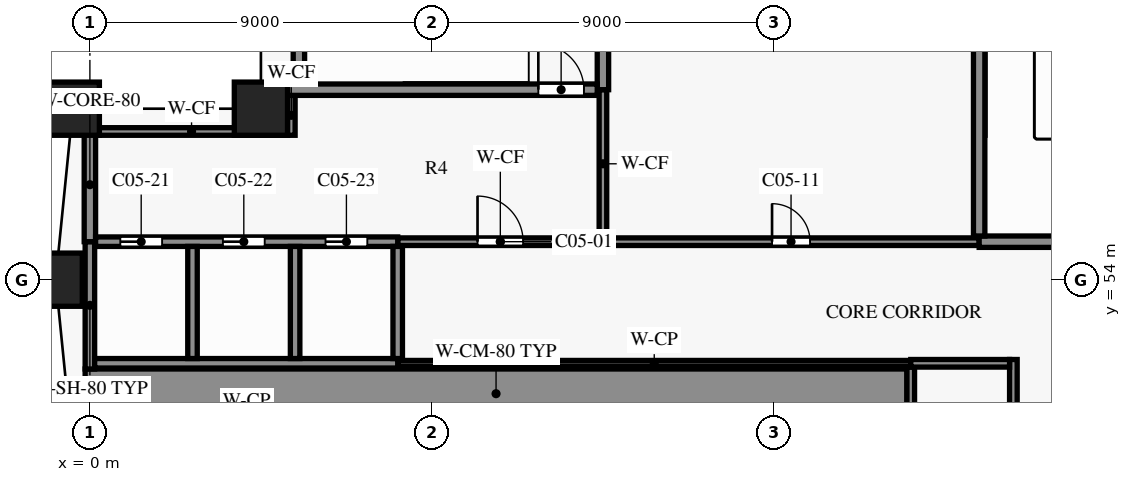
"""IFC4 building model, lengths in metres.
Left out: names, types, materials, properties, quantities, classifications, styles, units other than length and angle.
Written with IfcOpenShell. Run it as: python <this file> out.ifc"""

import sys

from ifc_helpers import new_model, si_unit, direction, frame, frame_2d, origin, origin_2d, place, context, subcontext, project, spatial, rectangle, extrude, element, fill, save


model = new_model("IFC4")
c1 = context("Model", 3, precision=1e-05, world=origin(), true_north=direction((0.0, 1.0)))
c2 = subcontext(c1, "Body", "Model", "MODEL_VIEW")
j1 = project(units=[si_unit("LENGTHUNIT", "METRE"), si_unit("PLANEANGLEUNIT", "RADIAN")], contexts=[c1])
p1 = place(None, origin())
s1 = spatial("IfcSite", under=j1, at=p1, CompositionType="ELEMENT")
p2 = place(p1, origin())
s2 = spatial("IfcBuilding", under=s1, at=p2, CompositionType="ELEMENT")
p3 = place(p2, frame((0.0, 0.0, 19.5)))
s3 = spatial("IfcBuildingStorey", under=s2, at=p3, CompositionType="ELEMENT", Elevation=19.5)
for number, where, z_axis, x_axis in (
    (1, (-0.45, 58.5, 0.0), (0.0, 0.0, 1.0), (1.0, 0.0, 0.0)),
    (2, (-0.9, 54.0, 0.0), (0.0, 0.0, 1.0), (1.0, 0.0, 0.0)),
    (3, (4.5, 58.5, 0.0), (0.0, 0.0, 1.0), (1.0, 0.0, 0.0)),
):
    element("IfcColumn", number, at=place(p3, frame(where, z_axis=z_axis, x_axis=x_axis)), inside=s3, PredefinedType="COLUMN", context=c2, shape_type="SweptSolid", body=[
        extrude(rectangle(XDim=1.4, YDim=1.4, at=origin_2d()), origin(), (0.0, 0.0, 1.0), 8.0),
    ])
p4 = place(p3, frame((-0.125, 51.0, 0.0), z_axis=(0.0, 0.0, 1.0), x_axis=(1.0, 0.0, 0.0)))
e4 = element("IfcWall", 4, at=p4, inside=s3, PredefinedType="SHEAR", context=c2, shape_type="SweptSolid", body=[
    extrude(rectangle(XDim=21.625, YDim=1.3, at=frame_2d((10.812, 0.0))), origin(), (0.0, 0.0, 1.0), 7.7),
])
p5 = place(p3, frame((8.1, 51.8, 0.0), z_axis=(0.0, 0.0, 1.0), x_axis=(1.0, 0.0, 0.0)))
e5 = element("IfcWall", 5, at=p5, inside=s3, PredefinedType="PARTITIONING", context=c2, shape_type="SweptSolid", body=[
    extrude(rectangle(XDim=13.5, YDim=0.15, at=frame_2d((6.75, 0.0))), origin(), (0.0, 0.0, 1.0), 7.7),
])
p6 = place(p3, frame((21.6, 51.8, 0.0), z_axis=(0.0, 0.0, 1.0), x_axis=(1.0, 0.0, 0.0)))
e6 = element("IfcWall", 6, at=p6, inside=s3, PredefinedType="PARTITIONING", context=c2, shape_type="SweptSolid", body=[
    extrude(rectangle(XDim=2.6, YDim=0.2, at=frame_2d((1.3, 0.0))), origin(), (0.0, 0.0, 1.0), 7.7),
])
p7 = place(p3, frame((0.125, 51.8, 0.0), z_axis=(0.0, 0.0, 1.0), x_axis=(1.0, 0.0, 0.0)))
e7 = element("IfcWall", 7, at=p7, inside=s3, PredefinedType="SHEAR", context=c2, shape_type="SweptSolid", body=[
    extrude(rectangle(XDim=7.975, YDim=0.25, at=frame_2d((3.988, 0.0))), origin(), (0.0, 0.0, 1.0), 7.7),
])
p8 = place(p3, frame((8.1, 55.0, 0.0), z_axis=(0.0, 0.0, 1.0), x_axis=(1.0, 0.0, 0.0)))
e8 = element("IfcWall", 8, at=p8, inside=s3, PredefinedType="PARTITIONING", context=c2, shape_type="SweptSolid", body=[
    extrude(rectangle(XDim=5.4, YDim=0.2, at=frame_2d((2.7, 0.0))), origin(), (0.0, 0.0, 1.0), 7.7),
])
p9 = place(p8, frame((2.1, 0.0, 0.0)))
e9 = element("IfcOpeningElement", 9, at=p9, cuts=e8, PredefinedType="OPENING", context=c2, shape_type="SweptSolid", body=[
    extrude(rectangle(XDim=1.2, YDim=2.2, at=frame_2d((0.6, 1.1))), frame((0.0, 0.11, 0.0), z_axis=(0.0, -1.0, 0.0), x_axis=(1.0, 0.0, 0.0)), (0.0, 0.0, 1.0), 0.22),
])
p10 = place(p3, frame((13.5, 55.0, 0.0), z_axis=(0.0, 0.0, 1.0), x_axis=(1.0, 0.0, 0.0)))
e10 = element("IfcWall", 10, at=p10, inside=s3, PredefinedType="PARTITIONING", context=c2, shape_type="SweptSolid", body=[
    extrude(rectangle(XDim=9.9, YDim=0.2, at=frame_2d((4.95, 0.0))), origin(), (0.0, 0.0, 1.0), 7.7),
])
p11 = place(p10, frame((4.45, 0.0, 0.0)))
e11 = element("IfcOpeningElement", 11, at=p11, cuts=e10, PredefinedType="OPENING", context=c2, shape_type="SweptSolid", body=[
    extrude(rectangle(XDim=1.0, YDim=2.1, at=frame_2d((0.5, 1.05))), frame((0.0, 0.11, 0.0), z_axis=(0.0, -1.0, 0.0), x_axis=(1.0, 0.0, 0.0)), (0.0, 0.0, 1.0), 0.22),
])
p12 = place(p3, frame((0.15, 55.0, 0.0), z_axis=(0.0, 0.0, 1.0), x_axis=(1.0, 0.0, 0.0)))
e12 = element("IfcWall", 12, at=p12, inside=s3, PredefinedType="SHEAR", context=c2, shape_type="SweptSolid", body=[
    extrude(rectangle(XDim=7.95, YDim=0.25, at=frame_2d((3.975, 0.0))), origin(), (0.0, 0.0, 1.0), 7.7),
])
p13 = place(p12, frame((0.65, 0.0, 0.0)))
e13 = element("IfcOpeningElement", 13, at=p13, cuts=e12, PredefinedType="OPENING", context=c2, shape_type="SweptSolid", body=[
    extrude(rectangle(XDim=1.1, YDim=2.1, at=frame_2d((0.55, 1.05))), frame((0.0, 0.135, 0.0), z_axis=(0.0, -1.0, 0.0), x_axis=(1.0, 0.0, 0.0)), (0.0, 0.0, 1.0), 0.27),
])
p14 = place(p12, frame((3.35, 0.0, 0.0)))
e14 = element("IfcOpeningElement", 14, at=p14, cuts=e12, PredefinedType="OPENING", context=c2, shape_type="SweptSolid", body=[
    extrude(rectangle(XDim=1.1, YDim=2.1, at=frame_2d((0.55, 1.05))), frame((0.0, 0.135, 0.0), z_axis=(0.0, -1.0, 0.0), x_axis=(1.0, 0.0, 0.0)), (0.0, 0.0, 1.0), 0.27),
])
p15 = place(p12, frame((6.05, 0.0, 0.0)))
e15 = element("IfcOpeningElement", 15, at=p15, cuts=e12, PredefinedType="OPENING", context=c2, shape_type="SweptSolid", body=[
    extrude(rectangle(XDim=1.1, YDim=2.1, at=frame_2d((0.55, 1.05))), frame((0.0, 0.135, 0.0), z_axis=(0.0, -1.0, 0.0), x_axis=(1.0, 0.0, 0.0)), (0.0, 0.0, 1.0), 0.27),
])
p16 = place(p3, frame((23.4, 55.0, 0.0), z_axis=(0.0, 0.0, 1.0), x_axis=(1.0, 0.0, 0.0)))
e16 = element("IfcWall", 16, at=p16, inside=s3, PredefinedType="SHEAR", context=c2, shape_type="SweptSolid", body=[
    extrude(rectangle(XDim=3.45, YDim=0.3, at=frame_2d((1.725, 0.0))), origin(), (0.0, 0.0, 1.0), 7.7),
])
p17 = place(p3, frame((0.15, 57.9, 0.0), z_axis=(0.0, 0.0, 1.0), x_axis=(1.0, 0.0, 0.0)))
e17 = element("IfcWall", 17, at=p17, inside=s3, PredefinedType="PARTITIONING", context=c2, shape_type="SweptSolid", body=[
    extrude(rectangle(XDim=5.05, YDim=0.2, at=frame_2d((2.525, 0.0))), origin(), (0.0, 0.0, 1.0), 7.7),
])
p18 = place(p3, frame((5.2, 59.0, 0.0), z_axis=(0.0, 0.0, 1.0), x_axis=(1.0, 0.0, 0.0)))
e18 = element("IfcWall", 18, at=p18, inside=s3, PredefinedType="SHEAR", context=c2, shape_type="SweptSolid", body=[
    extrude(rectangle(XDim=8.15, YDim=0.3, at=frame_2d((4.075, 0.0))), origin(), (0.0, 0.0, 1.0), 7.7),
])
p19 = place(p18, frame((6.6, 0.0, 0.0)))
e19 = element("IfcOpeningElement", 19, at=p19, cuts=e18, PredefinedType="OPENING", context=c2, shape_type="SweptSolid", body=[
    extrude(rectangle(XDim=1.2, YDim=2.2, at=frame_2d((0.6, 1.1))), frame((0.0, 0.16, 0.0), z_axis=(0.0, -1.0, 0.0), x_axis=(1.0, 0.0, 0.0)), (0.0, 0.0, 1.0), 0.32),
])
p20 = place(p3, frame((0.0, 55.0, 0.0), z_axis=(0.0, 0.0, 1.0), x_axis=(0.0, 1.0, 0.0)))
e20 = element("IfcWall", 20, at=p20, inside=s3, PredefinedType="SHEAR", context=c2, shape_type="SweptSolid", body=[
    extrude(rectangle(XDim=3.0, YDim=0.3, at=frame_2d((1.5, 0.0))), origin(), (0.0, 0.0, 1.0), 7.7),
])
p21 = place(p3, frame((0.0, 51.65, 0.0), z_axis=(0.0, 0.0, 1.0), x_axis=(0.0, 1.0, 0.0)))
e21 = element("IfcWall", 21, at=p21, inside=s3, PredefinedType="SHEAR", context=c2, shape_type="SweptSolid", body=[
    extrude(rectangle(XDim=3.35, YDim=0.25, at=frame_2d((1.675, 0.0))), origin(), (0.0, 0.0, 1.0), 7.7),
])
p22 = place(p3, frame((2.7, 51.925, 0.0), z_axis=(0.0, 0.0, 1.0), x_axis=(0.0, 1.0, 0.0)))
e22 = element("IfcWall", 22, at=p22, inside=s3, PredefinedType="SHEAR", context=c2, shape_type="SweptSolid", body=[
    extrude(rectangle(XDim=2.95, YDim=0.25, at=frame_2d((1.475, 0.0))), origin(), (0.0, 0.0, 1.0), 7.7),
])
p23 = place(p3, frame((5.3, 57.8, 0.0), z_axis=(0.0, 0.0, 1.0), x_axis=(0.0, 1.0, 0.0)))
e23 = element("IfcWall", 23, at=p23, inside=s3, PredefinedType="PARTITIONING", context=c2, shape_type="SweptSolid", body=[
    extrude(rectangle(XDim=1.05, YDim=0.2, at=frame_2d((0.525, 0.0))), origin(), (0.0, 0.0, 1.0), 7.7),
])
p24 = place(p3, frame((5.4, 51.925, 0.0), z_axis=(0.0, 0.0, 1.0), x_axis=(0.0, 1.0, 0.0)))
e24 = element("IfcWall", 24, at=p24, inside=s3, PredefinedType="SHEAR", context=c2, shape_type="SweptSolid", body=[
    extrude(rectangle(XDim=2.95, YDim=0.25, at=frame_2d((1.475, 0.0))), origin(), (0.0, 0.0, 1.0), 7.7),
])
p25 = place(p3, frame((5.5, 59.15, 0.0), z_axis=(0.0, 0.0, 1.0), x_axis=(0.0, 1.0, 0.0)))
e25 = element("IfcWall", 25, at=p25, inside=s3, PredefinedType="SHEAR", context=c2, shape_type="SweptSolid", body=[
    extrude(rectangle(XDim=3.6, YDim=0.3, at=frame_2d((1.8, 0.0))), origin(), (0.0, 0.0, 1.0), 7.7),
])
p26 = place(p3, frame((8.1, 51.925, 0.0), z_axis=(0.0, 0.0, 1.0), x_axis=(0.0, 1.0, 0.0)))
e26 = element("IfcWall", 26, at=p26, inside=s3, PredefinedType="SHEAR", context=c2, shape_type="SweptSolid", body=[
    extrude(rectangle(XDim=2.95, YDim=0.25, at=frame_2d((1.475, 0.0))), origin(), (0.0, 0.0, 1.0), 7.7),
])
p27 = place(p3, frame((13.5, 55.1, 0.0), z_axis=(0.0, 0.0, 1.0), x_axis=(0.0, 1.0, 0.0)))
e27 = element("IfcWall", 27, at=p27, inside=s3, PredefinedType="PARTITIONING", context=c2, shape_type="SweptSolid", body=[
    extrude(rectangle(XDim=3.9, YDim=0.2, at=frame_2d((1.95, 0.0))), origin(), (0.0, 0.0, 1.0), 7.7),
])
p28 = place(p3, frame((13.5, 59.0, 0.0), z_axis=(0.0, 0.0, 1.0), x_axis=(0.0, 1.0, 0.0)))
e28 = element("IfcWall", 28, at=p28, inside=s3, PredefinedType="SHEAR", context=c2, shape_type="SweptSolid", body=[
    extrude(rectangle(XDim=3.75, YDim=0.3, at=frame_2d((1.875, 0.0))), origin(), (0.0, 0.0, 1.0), 7.7),
])
p29 = place(p3, frame((21.6, 50.2, 0.0), z_axis=(0.0, 0.0, 1.0), x_axis=(0.0, 1.0, 0.0)))
e29 = element("IfcWall", 29, at=p29, inside=s3, PredefinedType="PARTITIONING", context=c2, shape_type="SweptSolid", body=[
    extrude(rectangle(XDim=1.5, YDim=0.2, at=frame_2d((0.75, 0.0))), origin(), (0.0, 0.0, 1.0), 7.7),
])
p30 = place(p3, frame((23.4, 55.15, 0.0), z_axis=(0.0, 0.0, 1.0), x_axis=(0.0, 1.0, 0.0)))
e30 = element("IfcWall", 30, at=p30, inside=s3, PredefinedType="SHEAR", context=c2, shape_type="SweptSolid", body=[
    extrude(rectangle(XDim=8.0, YDim=0.3, at=frame_2d((4.0, 0.0))), origin(), (0.0, 0.0, 1.0), 7.7),
])
p31 = place(p3, frame((24.3, 46.9, 0.0), z_axis=(0.0, 0.0, 1.0), x_axis=(0.0, 1.0, 0.0)))
e31 = element("IfcWall", 31, at=p31, inside=s3, PredefinedType="SHEAR", context=c2, shape_type="SweptSolid", body=[
    extrude(rectangle(XDim=5.0, YDim=0.2, at=frame_2d((2.5, 0.0))), origin(), (0.0, 0.0, 1.0), 7.7),
])
p32 = place(p9, origin())
e32 = element("IfcDoor", 32, at=p32, inside=s3, OperationType="SINGLE_SWING_RIGHT", PredefinedType="DOOR", context=c2, shape_type="SweptSolid", body=[
    extrude(rectangle(XDim=1.2, YDim=2.2, at=frame_2d((0.6, 1.1))), frame((0.0, 0.025, 0.0), z_axis=(0.0, -1.0, 0.0), x_axis=(1.0, 0.0, 0.0)), (0.0, 0.0, 1.0), 0.05),
])
fill(e9, e32)
p33 = place(p11, origin())
e33 = element("IfcDoor", 33, at=p33, inside=s3, OperationType="SINGLE_SWING_LEFT", PredefinedType="DOOR", context=c2, shape_type="SweptSolid", body=[
    extrude(rectangle(XDim=1.0, YDim=2.1, at=frame_2d((0.5, 1.05))), frame((0.0, 0.025, 0.0), z_axis=(0.0, -1.0, 0.0), x_axis=(1.0, 0.0, 0.0)), (0.0, 0.0, 1.0), 0.05),
])
fill(e11, e33)
p34 = place(p19, origin())
e34 = element("IfcDoor", 34, at=p34, inside=s3, OperationType="SINGLE_SWING_RIGHT", PredefinedType="DOOR", context=c2, shape_type="SweptSolid", body=[
    extrude(rectangle(XDim=1.2, YDim=2.2, at=frame_2d((0.6, 1.1))), frame((0.0, 0.025, 0.0), z_axis=(0.0, -1.0, 0.0), x_axis=(1.0, 0.0, 0.0)), (0.0, 0.0, 1.0), 0.05),
])
fill(e19, e34)
p35 = place(p13, origin())
e35 = element("IfcDoor", 35, at=p35, inside=s3, OperationType="DOUBLE_DOOR_SLIDING", PredefinedType="DOOR", context=c2, shape_type="SweptSolid", body=[
    extrude(rectangle(XDim=1.1, YDim=2.1, at=frame_2d((0.55, 1.05))), frame((0.0, 0.025, 0.0), z_axis=(0.0, -1.0, 0.0), x_axis=(1.0, 0.0, 0.0)), (0.0, 0.0, 1.0), 0.05),
])
fill(e13, e35)
p36 = place(p14, origin())
e36 = element("IfcDoor", 36, at=p36, inside=s3, OperationType="DOUBLE_DOOR_SLIDING", PredefinedType="DOOR", context=c2, shape_type="SweptSolid", body=[
    extrude(rectangle(XDim=1.1, YDim=2.1, at=frame_2d((0.55, 1.05))), frame((0.0, 0.025, 0.0), z_axis=(0.0, -1.0, 0.0), x_axis=(1.0, 0.0, 0.0)), (0.0, 0.0, 1.0), 0.05),
])
fill(e14, e36)
p37 = place(p15, origin())
e37 = element("IfcDoor", 37, at=p37, inside=s3, OperationType="DOUBLE_DOOR_SLIDING", PredefinedType="DOOR", context=c2, shape_type="SweptSolid", body=[
    extrude(rectangle(XDim=1.1, YDim=2.1, at=frame_2d((0.55, 1.05))), frame((0.0, 0.025, 0.0), z_axis=(0.0, -1.0, 0.0), x_axis=(1.0, 0.0, 0.0)), (0.0, 0.0, 1.0), 0.05),
])
fill(e15, e37)
save(model, sys.argv[1])
